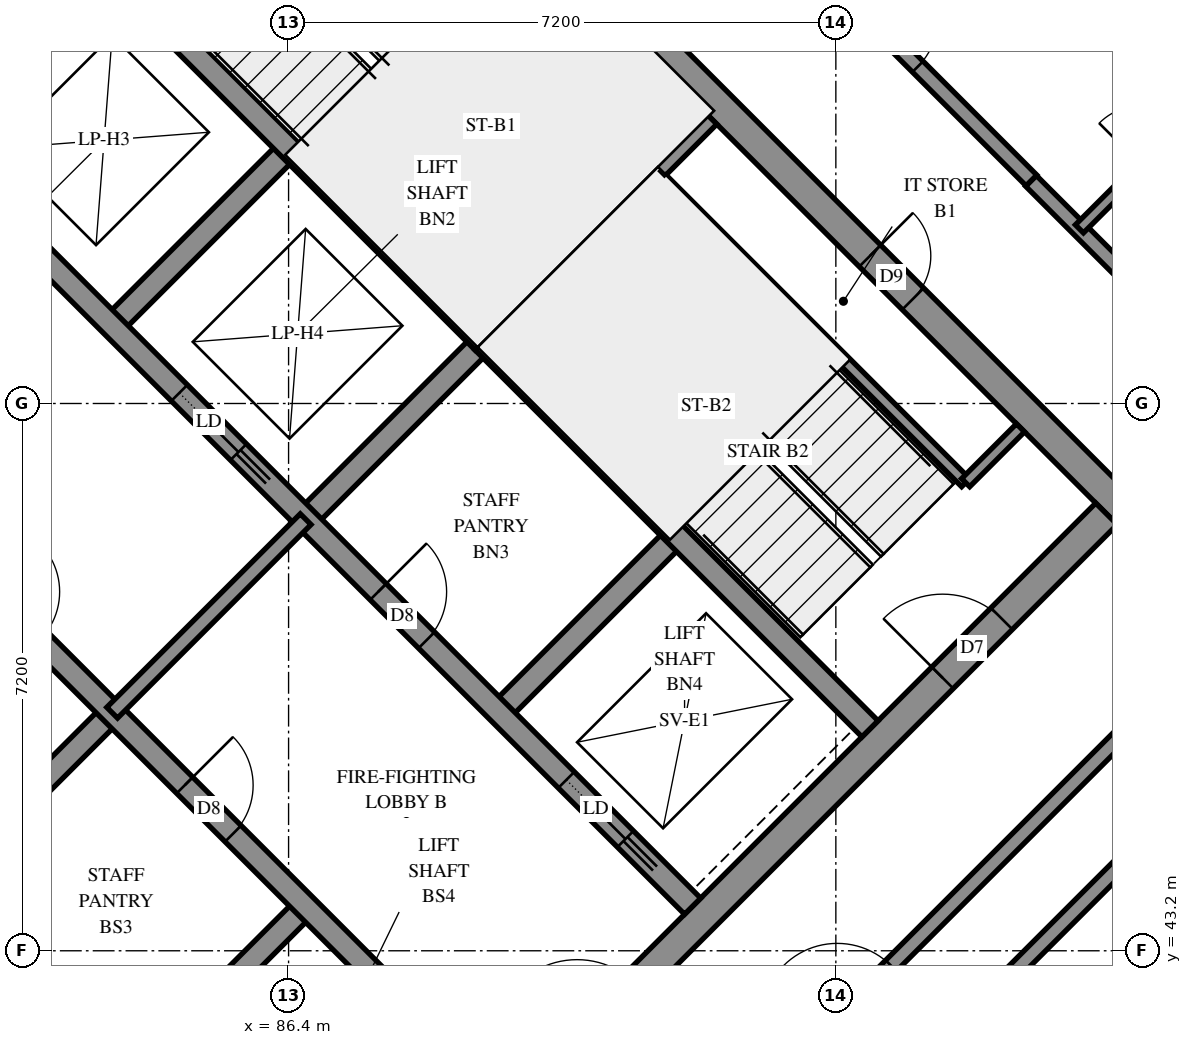
"""IFC4 building model, lengths in metres.
Left out: names, types, materials, properties, quantities, classifications, styles, units other than length and angle.
Written with IfcOpenShell. Run it as: python <this file> out.ifc"""

import sys

from ifc_helpers import new_model, si_unit, direction, frame, frame_2d, origin, place, context, subcontext, project, spatial, polyline, rectangle, outline, extrude, element, fill, save


model = new_model("IFC4")
c1 = context("Model", 3, precision=1e-05, world=origin(), true_north=direction((0.0, 1.0)))
c2 = subcontext(c1, "Body", "Model", "MODEL_VIEW")
j1 = project(units=[si_unit("LENGTHUNIT", "METRE"), si_unit("PLANEANGLEUNIT", "RADIAN")], contexts=[c1])
p1 = place(None, origin())
s1 = spatial("IfcSite", under=j1, at=p1, CompositionType="ELEMENT")
p2 = place(p1, origin())
s2 = spatial("IfcBuilding", under=s1, at=p2, CompositionType="ELEMENT")
p3 = place(p2, frame((0.0, 0.0, 250.6)))
s3 = spatial("IfcBuildingStorey", under=s2, at=p3, CompositionType="ELEMENT", Elevation=250.6)
p4 = place(p3, frame((76.23, 49.231, -0.3), z_axis=(0.0, 0.0, 1.0), x_axis=(0.7071034917, -0.7071100706, 0.0)))
e1 = element("IfcWall", 1, at=p4, inside=s3, PredefinedType="SHEAR", context=c2, shape_type="SweptSolid", body=[
    extrude(rectangle(XDim=15.2, YDim=0.4, at=frame_2d((7.6, 0.0))), origin(), (0.0, 0.0, 1.0), 2.7),
])
p5 = place(p3, frame((86.695, 59.696, -0.3), z_axis=(0.0, 0.0, 1.0), x_axis=(0.7071100706, -0.7071034917, 0.0)))
e2 = element("IfcWall", 2, at=p5, inside=s3, PredefinedType="SHEAR", context=c2, shape_type="SweptSolid", body=[
    extrude(rectangle(XDim=15.2, YDim=0.4, at=frame_2d((7.6, 0.0))), origin(), (0.0, 0.0, 1.0), 2.7),
])
p6 = place(p5, frame((10.4, 0.0, 0.3)))
e3 = element("IfcOpeningElement", 3, at=p6, cuts=e2, PredefinedType="OPENING", context=c2, shape_type="SweptSolid", body=[
    extrude(rectangle(XDim=0.8, YDim=2.1, at=frame_2d((0.4, 1.05))), frame((0.0, 0.21, 0.0), z_axis=(0.0, -1.0, 0.0), x_axis=(1.0, 0.0, 0.0)), (0.0, 0.0, 1.0), 0.42),
])
p7 = place(p3, frame((76.513, 49.231, -0.3), z_axis=(0.0, 0.0, 1.0), x_axis=(0.7071067812, 0.7071067812, 0.0)))
e4 = element("IfcWall", 4, at=p7, inside=s3, PredefinedType="SHEAR", context=c2, shape_type="SweptSolid", body=[
    extrude(rectangle(XDim=14.4, YDim=0.4, at=frame_2d((7.2, 0.0))), origin(), (0.0, 0.0, 1.0), 2.7),
])
p8 = place(p7, frame((4.55, 0.0, 0.3)))
e5 = element("IfcOpeningElement", 5, at=p8, cuts=e4, PredefinedType="OPENING", context=c2, shape_type="SweptSolid", body=[
    extrude(rectangle(XDim=1.1, YDim=2.1, at=frame_2d((0.55, 1.05))), frame((0.0, 0.21, 0.0), z_axis=(0.0, -1.0, 0.0), x_axis=(1.0, 0.0, 0.0)), (0.0, 0.0, 1.0), 0.42),
])
p9 = place(p7, frame((11.35, 0.0, 0.3)))
e6 = element("IfcOpeningElement", 6, at=p9, cuts=e4, PredefinedType="OPENING", context=c2, shape_type="SweptSolid", body=[
    extrude(rectangle(XDim=1.1, YDim=2.1, at=frame_2d((0.55, 1.05))), frame((0.0, 0.21, 0.0), z_axis=(0.0, -1.0, 0.0), x_axis=(1.0, 0.0, 0.0)), (0.0, 0.0, 1.0), 0.42),
])
p10 = place(p3, frame((86.978, 38.766, -0.3), z_axis=(0.0, 0.0, 1.0), x_axis=(0.7071067812, 0.7071067812, 0.0)))
e7 = element("IfcWall", 7, at=p10, inside=s3, PredefinedType="SHEAR", context=c2, shape_type="SweptSolid", body=[
    extrude(rectangle(XDim=14.4, YDim=0.4, at=frame_2d((7.2, 0.0))), origin(), (0.0, 0.0, 1.0), 2.7),
])
p11 = place(p10, frame((4.55, 0.0, 0.3)))
e8 = element("IfcOpeningElement", 8, at=p11, cuts=e7, PredefinedType="OPENING", context=c2, shape_type="SweptSolid", body=[
    extrude(rectangle(XDim=1.1, YDim=2.1, at=frame_2d((0.55, 1.05))), frame((0.0, 0.21, 0.0), z_axis=(0.0, -1.0, 0.0), x_axis=(1.0, 0.0, 0.0)), (0.0, 0.0, 1.0), 0.42),
])
p12 = place(p10, frame((11.35, 0.0, 0.3)))
e9 = element("IfcOpeningElement", 9, at=p12, cuts=e7, PredefinedType="OPENING", context=c2, shape_type="SweptSolid", body=[
    extrude(rectangle(XDim=1.1, YDim=2.1, at=frame_2d((0.55, 1.05))), frame((0.0, 0.21, 0.0), z_axis=(0.0, -1.0, 0.0), x_axis=(1.0, 0.0, 0.0)), (0.0, 0.0, 1.0), 0.42),
])
p13 = place(p3, frame((84.079, 51.423, 0.0), z_axis=(0.0, 0.0, 1.0), x_axis=(0.7071219326, 0.7070916295, 0.0)))
e10 = element("IfcWall", 10, at=p13, inside=s3, PredefinedType="SOLIDWALL", context=c2, shape_type="SweptSolid", body=[
    extrude(rectangle(XDim=3.3, YDim=0.3, at=frame_2d((1.65, 0.0))), origin(), (0.0, 0.0, 1.0), 3.1),
])
p14 = place(p3, frame((81.746, 43.999, 0.0), z_axis=(0.0, 0.0, 1.0), x_axis=(0.7071067812, 0.7071067812, 0.0)))
e11 = element("IfcWall", 11, at=p14, inside=s3, PredefinedType="SOLIDWALL", context=c2, shape_type="SweptSolid", body=[
    extrude(rectangle(XDim=3.3, YDim=0.3, at=frame_2d((1.65, 0.0))), origin(), (0.0, 0.0, 1.0), 3.1),
])
p15 = place(p3, frame((86.625, 48.878, 0.0), z_axis=(0.0, 0.0, 1.0), x_axis=(0.7071067812, 0.7071067812, 0.0)))
e12 = element("IfcWall", 12, at=p15, inside=s3, PredefinedType="SOLIDWALL", context=c2, shape_type="SweptSolid", body=[
    extrude(rectangle(XDim=3.3, YDim=0.3, at=frame_2d((1.65, 0.0))), origin(), (0.0, 0.0, 1.0), 3.1),
])
p16 = place(p3, frame((84.291, 41.453, 0.0), z_axis=(0.0, 0.0, 1.0), x_axis=(0.7071067812, 0.7071067812, 0.0)))
e13 = element("IfcWall", 13, at=p16, inside=s3, PredefinedType="SOLIDWALL", context=c2, shape_type="SweptSolid", body=[
    extrude(rectangle(XDim=3.3, YDim=0.3, at=frame_2d((1.65, 0.0))), origin(), (0.0, 0.0, 1.0), 3.1),
])
p17 = place(p3, frame((89.17, 46.332, 0.0), z_axis=(0.0, 0.0, 1.0), x_axis=(0.7071067812, 0.7071067812, 0.0)))
e14 = element("IfcWall", 14, at=p17, inside=s3, PredefinedType="SOLIDWALL", context=c2, shape_type="SweptSolid", body=[
    extrude(rectangle(XDim=3.3, YDim=0.3, at=frame_2d((1.65, 0.0))), origin(), (0.0, 0.0, 1.0), 3.1),
])
p18 = place(p3, frame((78.988, 51.423, 0.0), z_axis=(0.0, 0.0, 1.0), x_axis=(0.7071067812, -0.7071067812, 0.0)))
e15 = element("IfcWall", 15, at=p18, inside=s3, PredefinedType="SOLIDWALL", context=c2, shape_type="SweptSolid", body=[
    extrude(rectangle(XDim=14.4, YDim=0.3, at=frame_2d((7.2, 0.0))), origin(), (0.0, 0.0, 1.0), 3.1),
])
p19 = place(p18, frame((1.35, 0.0, 0.0)))
e16 = element("IfcOpeningElement", 16, at=p19, cuts=e15, PredefinedType="OPENING", context=c2, shape_type="SweptSolid", body=[
    extrude(rectangle(XDim=0.9, YDim=2.1, at=frame_2d((0.45, 1.05))), frame((0.0, 0.16, 0.0), z_axis=(0.0, -1.0, 0.0), x_axis=(1.0, 0.0, 0.0)), (0.0, 0.0, 1.0), 0.32),
])
p20 = place(p18, frame((4.95, 0.0, 0.0)))
e17 = element("IfcOpeningElement", 17, at=p20, cuts=e15, PredefinedType="OPENING", context=c2, shape_type="SweptSolid", body=[
    extrude(rectangle(XDim=0.9, YDim=2.1, at=frame_2d((0.45, 1.05))), frame((0.0, 0.16, 0.0), z_axis=(0.0, -1.0, 0.0), x_axis=(1.0, 0.0, 0.0)), (0.0, 0.0, 1.0), 0.32),
])
p21 = place(p18, frame((8.55, 0.0, 0.0)))
e18 = element("IfcOpeningElement", 18, at=p21, cuts=e15, PredefinedType="OPENING", context=c2, shape_type="SweptSolid", body=[
    extrude(rectangle(XDim=0.9, YDim=2.1, at=frame_2d((0.45, 1.05))), frame((0.0, 0.16, 0.0), z_axis=(0.0, -1.0, 0.0), x_axis=(1.0, 0.0, 0.0)), (0.0, 0.0, 1.0), 0.32),
])
p22 = place(p18, frame((12.05, 0.0, 0.0)))
e19 = element("IfcOpeningElement", 19, at=p22, cuts=e15, PredefinedType="OPENING", context=c2, shape_type="SweptSolid", body=[
    extrude(rectangle(XDim=1.1, YDim=2.1, at=frame_2d((0.55, 1.05))), frame((0.0, 0.16, 0.0), z_axis=(0.0, -1.0, 0.0), x_axis=(1.0, 0.0, 0.0)), (0.0, 0.0, 1.0), 0.32),
])
p23 = place(p3, frame((81.534, 53.969, 0.0), z_axis=(0.0, 0.0, 1.0), x_axis=(0.707103309, -0.7071102534, 0.0)))
e20 = element("IfcWall", 20, at=p23, inside=s3, PredefinedType="SOLIDWALL", context=c2, shape_type="SweptSolid", body=[
    extrude(rectangle(XDim=14.4, YDim=0.3, at=frame_2d((7.2, 0.0))), origin(), (0.0, 0.0, 1.0), 3.1),
])
p24 = place(p23, frame((8.55, 0.0, 0.0)))
e21 = element("IfcOpeningElement", 21, at=p24, cuts=e20, PredefinedType="OPENING", context=c2, shape_type="SweptSolid", body=[
    extrude(rectangle(XDim=0.9, YDim=2.1, at=frame_2d((0.45, 1.05))), frame((0.0, 0.16, 0.0), z_axis=(0.0, -1.0, 0.0), x_axis=(1.0, 0.0, 0.0)), (0.0, 0.0, 1.0), 0.32),
])
p25 = place(p23, frame((1.25, 0.0, 0.0)))
e22 = element("IfcOpeningElement", 22, at=p25, cuts=e20, PredefinedType="OPENING", context=c2, shape_type="SweptSolid", body=[
    extrude(rectangle(XDim=1.1, YDim=2.1, at=frame_2d((0.55, 1.05))), frame((0.0, 0.16, 0.0), z_axis=(0.0, -1.0, 0.0), x_axis=(1.0, 0.0, 0.0)), (0.0, 0.0, 1.0), 0.32),
])
p26 = place(p23, frame((4.85, 0.0, 0.0)))
e23 = element("IfcOpeningElement", 23, at=p26, cuts=e20, PredefinedType="OPENING", context=c2, shape_type="SweptSolid", body=[
    extrude(rectangle(XDim=1.1, YDim=2.1, at=frame_2d((0.55, 1.05))), frame((0.0, 0.16, 0.0), z_axis=(0.0, -1.0, 0.0), x_axis=(1.0, 0.0, 0.0)), (0.0, 0.0, 1.0), 0.32),
])
p27 = place(p23, frame((12.05, 0.0, 0.0)))
e24 = element("IfcOpeningElement", 24, at=p27, cuts=e20, PredefinedType="OPENING", context=c2, shape_type="SweptSolid", body=[
    extrude(rectangle(XDim=1.1, YDim=2.1, at=frame_2d((0.55, 1.05))), frame((0.0, 0.16, 0.0), z_axis=(0.0, -1.0, 0.0), x_axis=(1.0, 0.0, 0.0)), (0.0, 0.0, 1.0), 0.32),
])
for number, where, z_axis, x_axis in (
    (25, (83.867, 56.302, 0.0), (0.0, 0.0, 1.0), (0.707, -0.707, 0.0)),
    (26, (88.958, 51.211, 0.0), (0.0, 0.0, 1.0), (0.707, -0.707, 0.0)),
):
    element("IfcWall", number, at=place(p3, frame(where, z_axis=z_axis, x_axis=x_axis)), inside=s3, PredefinedType="SOLIDWALL", context=c2, shape_type="SweptSolid", body=[
        extrude(rectangle(XDim=7.2, YDim=0.3, at=frame_2d((3.6, 0.0))), origin(), (0.0, 0.0, 1.0), 3.1),
    ])
p28 = place(p3, frame((88.958, 51.211, 0.0), z_axis=(0.0, 0.0, 1.0), x_axis=(0.7071067812, 0.7071067812, 0.0)))
e27 = element("IfcWall", 27, at=p28, inside=s3, PredefinedType="SOLIDWALL", context=c2, shape_type="SweptSolid", body=[
    extrude(rectangle(XDim=4.2, YDim=0.3, at=frame_2d((2.1, 0.0))), origin(), (0.0, 0.0, 1.0), 3.1),
])
p29 = place(p3, frame((98.345, 54.742, 0.0), z_axis=(0.0, 0.0, 1.0), x_axis=(-0.7792172545, 0.6267539152, 0.0)))
e28 = element("IfcWall", 28, at=p29, inside=s3, PredefinedType="SOLIDWALL", context=c2, shape_type="SweptSolid", body=[
    extrude(outline(polyline([(-0.024, -0.225), (3.325, -0.225), (3.373, 0.225), (0.024, 0.225), (-0.024, -0.225)])), origin(), (0.0, 0.0, 1.0), 3.1),
])
p30 = place(p29, frame((1.247, 0.0, 0.45)))
e29 = element("IfcOpeningElement", 29, at=p30, cuts=e28, PredefinedType="OPENING", context=c2, shape_type="SweptSolid", body=[
    extrude(rectangle(XDim=1.2, YDim=2.55, at=frame_2d((0.6, 1.275))), frame((0.0, 0.235, 0.0), z_axis=(0.0, -1.0, 0.0), x_axis=(1.0, 0.0, 0.0)), (0.0, 0.0, 1.0), 0.47),
])
p31 = place(p3, frame((91.313, 53.354, 0.0), z_axis=(0.0, 0.0, 1.0), x_axis=(0.7071067812, -0.7071067812, 0.0)))
e30 = element("IfcWall", 30, at=p31, inside=s3, PredefinedType="PARTITIONING", context=c2, shape_type="SweptSolid", body=[
    extrude(rectangle(XDim=5.65, YDim=0.15, at=frame_2d((2.825, 0.0))), origin(), (0.0, 0.0, 1.0), 3.1),
])
p32 = place(p3, frame((95.308, 49.358, 0.0), z_axis=(0.0, 0.0, 1.0), x_axis=(0.70705776, 0.707155799, 0.0)))
e31 = element("IfcWall", 31, at=p32, inside=s3, PredefinedType="PARTITIONING", context=c2, shape_type="SweptSolid", body=[
    extrude(rectangle(XDim=1.02, YDim=0.15, at=frame_2d((0.51, 0.0))), origin(), (0.0, 0.0, 1.0), 3.1),
])
p33 = place(p3, frame((84.079, 46.332, 0.0), z_axis=(0.0, 0.0, 1.0), x_axis=(0.7071067812, 0.7071067812, 0.0)))
e32 = element("IfcWall", 32, at=p33, inside=s3, PredefinedType="PARTITIONING", context=c2, shape_type="SweptSolid", body=[
    extrude(rectangle(XDim=3.6, YDim=0.2, at=frame_2d((1.8, 0.0))), origin(), (0.0, 0.0, 1.0), 3.1),
])
p34 = place(p3, frame((93.483, 42.161, 0.0), z_axis=(0.0, 0.0, 1.0), x_axis=(0.7071067812, 0.7071067812, 0.0)))
e33 = element("IfcWall", 33, at=p34, inside=s3, PredefinedType="PARTITIONING", context=c2, shape_type="SweptSolid", body=[
    extrude(rectangle(XDim=9.8, YDim=0.2, at=frame_2d((4.9, 0.0))), origin(), (0.0, 0.0, 1.0), 3.1),
])
p35 = place(p34, frame((0.193, 0.0, 0.0)))
e34 = element("IfcOpeningElement", 34, at=p35, cuts=e33, PredefinedType="OPENING", context=c2, shape_type="SweptSolid", body=[
    extrude(rectangle(XDim=1.0, YDim=2.1, at=frame_2d((0.5, 1.05))), frame((0.0, 0.11, 0.0), z_axis=(0.0, -1.0, 0.0), x_axis=(1.0, 0.0, 0.0)), (0.0, 0.0, 1.0), 0.22),
])
p36 = place(p3, frame((94.331, 41.313, 0.0), z_axis=(0.0, 0.0, 1.0), x_axis=(0.7071139756, 0.7070995867, 0.0)))
e35 = element("IfcWall", 35, at=p36, inside=s3, PredefinedType="PARTITIONING", context=c2, shape_type="SweptSolid", body=[
    extrude(rectangle(XDim=6.95, YDim=0.2, at=frame_2d((3.475, 0.0))), origin(), (0.0, 0.0, 1.0), 3.1),
])
p37 = place(p3, frame((96.167, 53.329, 0.0), z_axis=(0.0, 0.0, 1.0), x_axis=(0.7071067812, -0.7071067812, 0.0)))
e36 = element("IfcWall", 36, at=p37, inside=s3, PredefinedType="PARTITIONING", context=c2, shape_type="SweptSolid", body=[
    extrude(rectangle(XDim=3.999, YDim=0.2, at=frame_2d((2.0, 0.0))), origin(), (0.0, 0.0, 1.0), 3.1),
])
p38 = place(p3, frame((93.629, 55.881, 0.0), z_axis=(0.0, 0.0, 1.0), x_axis=(0.7068288851, -0.7073845681, 0.0)))
e37 = element("IfcWall", 37, at=p38, inside=s3, PredefinedType="PARTITIONING", context=c2, shape_type="SweptSolid", body=[
    extrude(rectangle(XDim=3.599, YDim=0.2, at=frame_2d((1.8, 0.0))), origin(), (0.0, 0.0, 1.0), 3.1),
])
p39 = place(p38, frame((0.584, 0.0, 0.0)))
e38 = element("IfcOpeningElement", 38, at=p39, cuts=e37, PredefinedType="OPENING", context=c2, shape_type="SweptSolid", body=[
    extrude(rectangle(XDim=0.9, YDim=2.1, at=frame_2d((0.45, 1.05))), frame((0.0, 0.11, 0.0), z_axis=(0.0, -1.0, 0.0), x_axis=(1.0, 0.0, 0.0)), (0.0, 0.0, 1.0), 0.22),
])
p40 = place(p3, frame((96.804, 52.698, 0.0), z_axis=(0.0, 0.0, 1.0), x_axis=(0.7075691222, 0.7066441377, 0.0)))
e39 = element("IfcWall", 39, at=p40, inside=s3, PredefinedType="PARTITIONING", context=c2, shape_type="SweptSolid", body=[
    extrude(rectangle(XDim=2.27, YDim=0.15, at=frame_2d((1.135, 0.0))), origin(), (0.0, 0.0, 1.0), 3.1),
])
p41 = place(p40, frame((1.166, 0.0, 0.0)))
e40 = element("IfcOpeningElement", 40, at=p41, cuts=e39, PredefinedType="OPENING", context=c2, shape_type="SweptSolid", body=[
    extrude(rectangle(XDim=0.8, YDim=2.1, at=frame_2d((0.4, 1.05))), frame((0.0, 0.085, 0.0), z_axis=(0.0, -1.0, 0.0), x_axis=(1.0, 0.0, 0.0)), (0.0, 0.0, 1.0), 0.17),
])
p42 = place(p6, origin())
e41 = element("IfcDoor", 41, at=p42, inside=s3, OperationType="SINGLE_SWING_RIGHT", PredefinedType="DOOR", context=c2, shape_type="SweptSolid", body=[
    extrude(rectangle(XDim=0.8, YDim=2.1, at=frame_2d((0.4, 1.05))), frame((0.0, 0.025, 0.0), z_axis=(0.0, -1.0, 0.0), x_axis=(1.0, 0.0, 0.0)), (0.0, 0.0, 1.0), 0.05),
])
fill(e3, e41)
p43 = place(p12, origin())
e42 = element("IfcDoor", 42, at=p43, inside=s3, OperationType="SINGLE_SWING_RIGHT", PredefinedType="DOOR", context=c2, shape_type="SweptSolid", body=[
    extrude(rectangle(XDim=1.1, YDim=2.1, at=frame_2d((0.55, 1.05))), frame((0.0, 0.025, 0.0), z_axis=(0.0, -1.0, 0.0), x_axis=(1.0, 0.0, 0.0)), (0.0, 0.0, 1.0), 0.05),
])
fill(e9, e42)
p44 = place(p21, origin())
e43 = element("IfcDoor", 43, at=p44, inside=s3, OperationType="SINGLE_SWING_LEFT", PredefinedType="DOOR", context=c2, shape_type="SweptSolid", body=[
    extrude(rectangle(XDim=0.9, YDim=2.1, at=frame_2d((0.45, 1.05))), frame((0.0, 0.025, 0.0), z_axis=(0.0, -1.0, 0.0), x_axis=(1.0, 0.0, 0.0)), (0.0, 0.0, 1.0), 0.05),
])
fill(e18, e43)
p45 = place(p24, origin())
e44 = element("IfcDoor", 44, at=p45, inside=s3, OperationType="SINGLE_SWING_LEFT", PredefinedType="DOOR", context=c2, shape_type="SweptSolid", body=[
    extrude(rectangle(XDim=0.9, YDim=2.1, at=frame_2d((0.45, 1.05))), frame((0.0, 0.025, 0.0), z_axis=(0.0, -1.0, 0.0), x_axis=(1.0, 0.0, 0.0)), (0.0, 0.0, 1.0), 0.05),
])
fill(e21, e44)
p46 = place(p26, origin())
e45 = element("IfcDoor", 45, at=p46, inside=s3, OperationType="SLIDING_TO_RIGHT", PredefinedType="DOOR", context=c2, shape_type="SweptSolid", body=[
    extrude(rectangle(XDim=1.1, YDim=2.1, at=frame_2d((0.55, 1.05))), frame((0.0, 0.025, 0.0), z_axis=(0.0, -1.0, 0.0), x_axis=(1.0, 0.0, 0.0)), (0.0, 0.0, 1.0), 0.05),
])
fill(e23, e45)
p47 = place(p27, origin())
e46 = element("IfcDoor", 46, at=p47, inside=s3, OperationType="SLIDING_TO_RIGHT", PredefinedType="DOOR", context=c2, shape_type="SweptSolid", body=[
    extrude(rectangle(XDim=1.1, YDim=2.1, at=frame_2d((0.55, 1.05))), frame((0.0, 0.025, 0.0), z_axis=(0.0, -1.0, 0.0), x_axis=(1.0, 0.0, 0.0)), (0.0, 0.0, 1.0), 0.05),
])
fill(e24, e46)
p48 = place(p39, origin())
e47 = element("IfcDoor", 47, at=p48, inside=s3, OperationType="SINGLE_SWING_LEFT", PredefinedType="DOOR", context=c2, shape_type="SweptSolid", body=[
    extrude(rectangle(XDim=0.9, YDim=2.1, at=frame_2d((0.45, 1.05))), frame((0.0, 0.025, 0.0), z_axis=(0.0, -1.0, 0.0), x_axis=(1.0, 0.0, 0.0)), (0.0, 0.0, 1.0), 0.05),
])
fill(e38, e47)
p49 = place(p35, origin())
e48 = element("IfcDoor", 48, at=p49, inside=s3, OperationType="SINGLE_SWING_LEFT", PredefinedType="DOOR", context=c2, shape_type="SweptSolid", body=[
    extrude(rectangle(XDim=1.0, YDim=2.1, at=frame_2d((0.5, 1.05))), frame((0.0, 0.025, 0.0), z_axis=(0.0, -1.0, 0.0), x_axis=(1.0, 0.0, 0.0)), (0.0, 0.0, 1.0), 0.05),
])
fill(e34, e48)
save(model, sys.argv[1])
